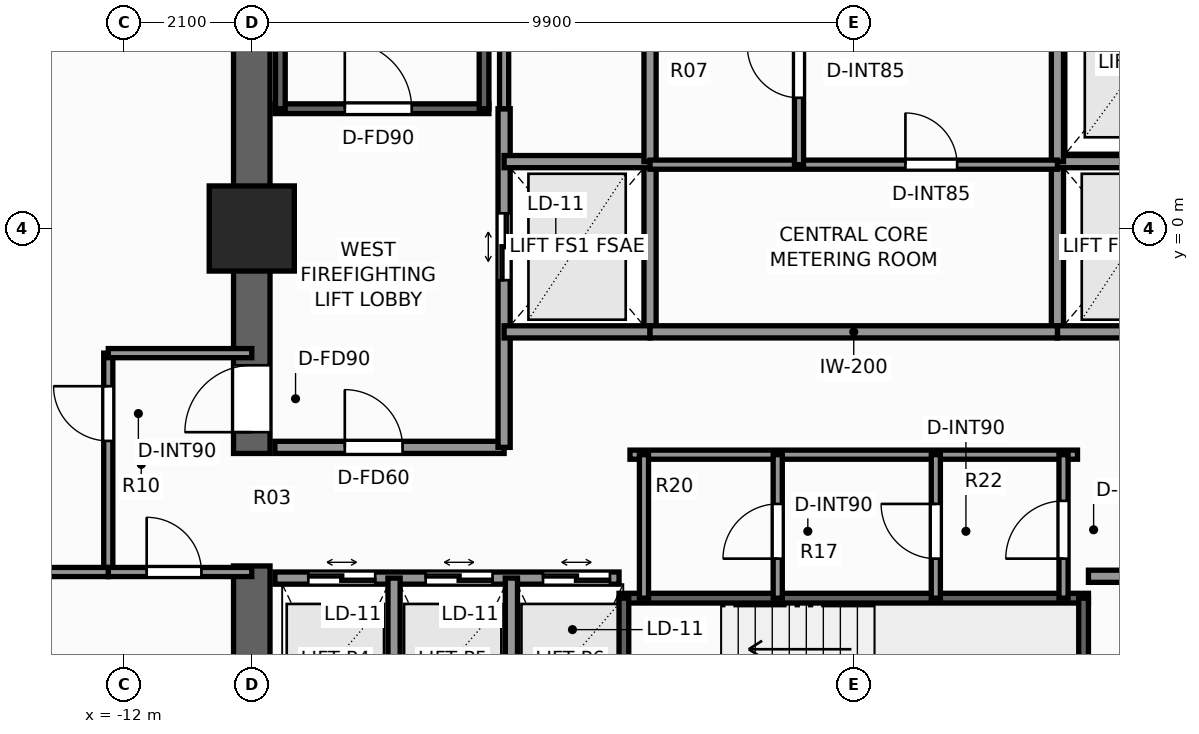
"""IFC4 building model, lengths in metres.
Left out: names, types, materials, properties, quantities, classifications, styles, units other than length and angle.
Written with IfcOpenShell. Run it as: python <this file> out.ifc"""

import sys

from ifc_helpers import new_model, si_unit, direction, frame, frame_2d, origin, origin_2d, place, context, subcontext, project, spatial, rectangle, extrude, element, fill, save


model = new_model("IFC4")
c1 = context("Model", 3, precision=1e-05, world=origin(), true_north=direction((0.0, 1.0)))
c2 = subcontext(c1, "Body", "Model", "MODEL_VIEW")
j1 = project(units=[si_unit("LENGTHUNIT", "METRE"), si_unit("PLANEANGLEUNIT", "RADIAN")], contexts=[c1])
p1 = place(None, origin())
s1 = spatial("IfcSite", under=j1, at=p1, CompositionType="ELEMENT")
p2 = place(p1, origin())
s2 = spatial("IfcBuilding", under=s1, at=p2, CompositionType="ELEMENT")
p3 = place(p2, frame((0.0, 0.0, 98.6)))
s3 = spatial("IfcBuildingStorey", under=s2, at=p3, CompositionType="ELEMENT", Elevation=98.6)
p4 = place(p3, frame((-9.9, -9.6, 0.0), z_axis=(0.0, 0.0, 1.0), x_axis=(0.0, 1.0, 0.0)))
e1 = element("IfcWall", 1, at=p4, inside=s3, PredefinedType="SHEAR", context=c2, shape_type="SweptSolid", body=[
    extrude(rectangle(XDim=4.05, YDim=0.6, at=frame_2d((2.025, 0.0))), origin(), (0.0, 0.0, 1.0), 3.3),
])
p5 = place(p3, frame((-9.9, -3.7, 0.0), z_axis=(0.0, 0.0, 1.0), x_axis=(0.0, 1.0, 0.0)))
e2 = element("IfcWall", 2, at=p5, inside=s3, PredefinedType="SHEAR", context=c2, shape_type="SweptSolid", body=[
    extrude(rectangle(XDim=13.3, YDim=0.6, at=frame_2d((6.65, 0.0))), origin(), (0.0, 0.0, 1.0), 3.3),
])
p6 = place(p5, frame((0.35, 0.0, 0.0)))
e3 = element("IfcOpeningElement", 3, at=p6, cuts=e2, PredefinedType="OPENING", context=c2, shape_type="SweptSolid", body=[
    extrude(rectangle(XDim=1.1, YDim=2.2, at=frame_2d((0.55, 1.1))), frame((0.0, 0.31, 0.0), z_axis=(0.0, -1.0, 0.0), x_axis=(1.0, 0.0, 0.0)), (0.0, 0.0, 1.0), 0.62),
])
p7 = place(p3, frame((-9.9, 0.0, 0.0), z_axis=(0.0, 0.0, 1.0), x_axis=(1.0, 0.0, 0.0)))
e4 = element("IfcColumn", 4, at=p7, inside=s3, PredefinedType="COLUMN", context=c2, shape_type="SweptSolid", body=[
    extrude(rectangle(XDim=1.4, YDim=1.4, at=origin_2d()), origin(), (0.0, 0.0, 1.0), 3.3),
])
p8 = place(p3, frame((-9.52, 1.97, 0.0), z_axis=(0.0, 0.0, 1.0), x_axis=(1.0, 0.0, 0.0)))
e5 = element("IfcWall", 5, at=p8, inside=s3, PredefinedType="SHEAR", context=c2, shape_type="SweptSolid", body=[
    extrude(rectangle(XDim=3.52, YDim=0.16, at=frame_2d((1.76, 0.0))), origin(), (0.0, 0.0, 1.0), 3.3),
])
p9 = place(p8, frame((1.15, 0.0, 0.0)))
e6 = element("IfcOpeningElement", 6, at=p9, cuts=e5, PredefinedType="OPENING", context=c2, shape_type="SweptSolid", body=[
    extrude(rectangle(XDim=1.1, YDim=2.2, at=frame_2d((0.55, 1.1))), frame((0.0, 0.09, 0.0), z_axis=(0.0, -1.0, 0.0), x_axis=(1.0, 0.0, 0.0)), (0.0, 0.0, 1.0), 0.18),
])
for number, where, z_axis, x_axis in (
    (7, (-9.43, 1.97, 0.0), (0.0, 0.0, 1.0), (0.0, 1.0, 0.0)),
    (8, (-6.08, 1.97, 0.0), (0.0, 0.0, 1.0), (0.0, 1.0, 0.0)),
):
    element("IfcWall", number, at=place(p3, frame(where, z_axis=z_axis, x_axis=x_axis)), inside=s3, PredefinedType="SHEAR", context=c2, shape_type="SweptSolid", body=[
        extrude(rectangle(XDim=7.56, YDim=0.16, at=frame_2d((3.78, 0.0))), origin(), (0.0, 0.0, 1.0), 3.3),
    ])
p10 = place(p3, frame((-3.86, -6.08, 0.0), z_axis=(0.0, 0.0, 1.0), x_axis=(1.0, 0.0, 0.0)))
e9 = element("IfcWall", 9, at=p10, inside=s3, PredefinedType="SHEAR", context=c2, shape_type="SweptSolid", body=[
    extrude(rectangle(XDim=7.72, YDim=0.16, at=frame_2d((3.86, 0.0))), origin(), (0.0, 0.0, 1.0), 3.3),
])
for number, where, z_axis, x_axis in (
    (10, (-3.78, -9.43, 0.0), (0.0, 0.0, 1.0), (0.0, 1.0, 0.0)),
    (11, (3.78, -9.43, 0.0), (0.0, 0.0, 1.0), (0.0, 1.0, 0.0)),
):
    element("IfcWall", number, at=place(p3, frame(where, z_axis=z_axis, x_axis=x_axis)), inside=s3, PredefinedType="SHEAR", context=c2, shape_type="SweptSolid", body=[
        extrude(rectangle(XDim=3.35, YDim=0.16, at=frame_2d((1.675, 0.0))), origin(), (0.0, 0.0, 1.0), 3.3),
    ])
p11 = place(p3, frame((-9.52, -3.6, 0.0), z_axis=(0.0, 0.0, 1.0), x_axis=(1.0, 0.0, 0.0)))
e12 = element("IfcWall", 12, at=p11, inside=s3, PredefinedType="SOLIDWALL", context=c2, shape_type="SweptSolid", body=[
    extrude(rectangle(XDim=3.77, YDim=0.2, at=frame_2d((1.885, 0.0))), origin(), (0.0, 0.0, 1.0), 3.08),
])
p12 = place(p11, frame((1.15, 0.0, 0.0)))
e13 = element("IfcOpeningElement", 13, at=p12, cuts=e12, PredefinedType="OPENING", context=c2, shape_type="SweptSolid", body=[
    extrude(rectangle(XDim=0.95, YDim=2.06, at=frame_2d((0.475, 1.03))), frame((0.0, 0.11, 0.0), z_axis=(0.0, -1.0, 0.0), x_axis=(1.0, 0.0, 0.0)), (0.0, 0.0, 1.0), 0.22),
])
p13 = place(p3, frame((-5.75, -3.6, 0.0), z_axis=(0.0, 0.0, 1.0), x_axis=(0.0, 1.0, 0.0)))
e14 = element("IfcWall", 14, at=p13, inside=s3, PredefinedType="SOLIDWALL", context=c2, shape_type="SweptSolid", body=[
    extrude(rectangle(XDim=5.57, YDim=0.2, at=frame_2d((2.785, 0.0))), origin(), (0.0, 0.0, 1.0), 3.08),
])
p14 = place(p13, frame((2.75, 0.0, 0.0)))
e15 = element("IfcOpeningElement", 15, at=p14, cuts=e14, PredefinedType="OPENING", context=c2, shape_type="SweptSolid", body=[
    extrude(rectangle(XDim=1.1, YDim=2.2, at=frame_2d((0.55, 1.1))), frame((0.0, 0.11, 0.0), z_axis=(0.0, -1.0, 0.0), x_axis=(1.0, 0.0, 0.0)), (0.0, 0.0, 1.0), 0.22),
])
p15 = place(p3, frame((-3.35, -1.7, 0.0), z_axis=(0.0, 0.0, 1.0), x_axis=(0.0, 1.0, 0.0)))
e16 = element("IfcWall", 16, at=p15, inside=s3, PredefinedType="SOLIDWALL", context=c2, shape_type="SweptSolid", body=[
    extrude(rectangle(XDim=2.8, YDim=0.2, at=frame_2d((1.4, 0.0))), origin(), (0.0, 0.0, 1.0), 3.08),
])
for number, where, z_axis, x_axis in (
    (17, (-5.75, -1.7, 0.0), (0.0, 0.0, 1.0), (1.0, 0.0, 0.0)),
    (18, (-5.75, 1.1, 0.0), (0.0, 0.0, 1.0), (1.0, 0.0, 0.0)),
):
    element("IfcWall", number, at=place(p3, frame(where, z_axis=z_axis, x_axis=x_axis)), inside=s3, PredefinedType="SOLIDWALL", context=c2, shape_type="SweptSolid", body=[
        extrude(rectangle(XDim=2.4, YDim=0.2, at=frame_2d((1.2, 0.0))), origin(), (0.0, 0.0, 1.0), 3.08),
    ])
p16 = place(p3, frame((3.35, -1.7, 0.0), z_axis=(0.0, 0.0, 1.0), x_axis=(0.0, 1.0, 0.0)))
e19 = element("IfcWall", 19, at=p16, inside=s3, PredefinedType="SOLIDWALL", context=c2, shape_type="SweptSolid", body=[
    extrude(rectangle(XDim=2.8, YDim=0.2, at=frame_2d((1.4, 0.0))), origin(), (0.0, 0.0, 1.0), 3.08),
])
for number, where, z_axis, x_axis in (
    (20, (3.35, -1.7, 0.0), (0.0, 0.0, 1.0), (1.0, 0.0, 0.0)),
    (21, (3.35, 1.1, 0.0), (0.0, 0.0, 1.0), (1.0, 0.0, 0.0)),
):
    element("IfcWall", number, at=place(p3, frame(where, z_axis=z_axis, x_axis=x_axis)), inside=s3, PredefinedType="SOLIDWALL", context=c2, shape_type="SweptSolid", body=[
        extrude(rectangle(XDim=2.4, YDim=0.2, at=frame_2d((1.2, 0.0))), origin(), (0.0, 0.0, 1.0), 3.08),
    ])
p17 = place(p3, frame((-9.52, -5.75, 0.0), z_axis=(0.0, 0.0, 1.0), x_axis=(1.0, 0.0, 0.0)))
e22 = element("IfcWall", 22, at=p17, inside=s3, PredefinedType="SOLIDWALL", context=c2, shape_type="SweptSolid", body=[
    extrude(rectangle(XDim=5.66, YDim=0.2, at=frame_2d((2.83, 0.0))), origin(), (0.0, 0.0, 1.0), 3.08),
])
p18 = place(p17, frame((0.55, 0.0, 0.0)))
e23 = element("IfcOpeningElement", 23, at=p18, cuts=e22, PredefinedType="OPENING", context=c2, shape_type="SweptSolid", body=[
    extrude(rectangle(XDim=1.1, YDim=2.2, at=frame_2d((0.55, 1.1))), frame((0.0, 0.11, 0.0), z_axis=(0.0, -1.0, 0.0), x_axis=(1.0, 0.0, 0.0)), (0.0, 0.0, 1.0), 0.22),
])
p19 = place(p17, frame((2.48, 0.0, 0.0)))
e24 = element("IfcOpeningElement", 24, at=p19, cuts=e22, PredefinedType="OPENING", context=c2, shape_type="SweptSolid", body=[
    extrude(rectangle(XDim=1.1, YDim=2.2, at=frame_2d((0.55, 1.1))), frame((0.0, 0.11, 0.0), z_axis=(0.0, -1.0, 0.0), x_axis=(1.0, 0.0, 0.0)), (0.0, 0.0, 1.0), 0.22),
])
p20 = place(p17, frame((4.41, 0.0, 0.0)))
e25 = element("IfcOpeningElement", 25, at=p20, cuts=e22, PredefinedType="OPENING", context=c2, shape_type="SweptSolid", body=[
    extrude(rectangle(XDim=1.1, YDim=2.2, at=frame_2d((0.55, 1.1))), frame((0.0, 0.11, 0.0), z_axis=(0.0, -1.0, 0.0), x_axis=(1.0, 0.0, 0.0)), (0.0, 0.0, 1.0), 0.22),
])
for number, where, z_axis, x_axis in (
    (26, (-7.56, -9.52, 0.0), (0.0, 0.0, 1.0), (0.0, 1.0, 0.0)),
    (27, (-5.63, -9.52, 0.0), (0.0, 0.0, 1.0), (0.0, 1.0, 0.0)),
):
    element("IfcWall", number, at=place(p3, frame(where, z_axis=z_axis, x_axis=x_axis)), inside=s3, PredefinedType="SOLIDWALL", context=c2, shape_type="SweptSolid", body=[
        extrude(rectangle(XDim=3.77, YDim=0.2, at=frame_2d((1.885, 0.0))), origin(), (0.0, 0.0, 1.0), 3.08),
    ])
p21 = place(p3, frame((3.86, -5.72, 0.0), z_axis=(0.0, 0.0, 1.0), x_axis=(1.0, 0.0, 0.0)))
e28 = element("IfcWall", 28, at=p21, inside=s3, PredefinedType="SOLIDWALL", context=c2, shape_type="SweptSolid", body=[
    extrude(rectangle(XDim=5.66, YDim=0.2, at=frame_2d((2.83, 0.0))), origin(), (0.0, 0.0, 1.0), 3.08),
])
p22 = place(p21, frame((0.85, 0.0, 0.0)))
e29 = element("IfcOpeningElement", 29, at=p22, cuts=e28, PredefinedType="OPENING", context=c2, shape_type="SweptSolid", body=[
    extrude(rectangle(XDim=0.95, YDim=2.06, at=frame_2d((0.475, 1.03))), frame((0.0, 0.11, 0.0), z_axis=(0.0, -1.0, 0.0), x_axis=(1.0, 0.0, 0.0)), (0.0, 0.0, 1.0), 0.22),
])
p23 = place(p21, frame((3.6, 0.0, 0.0)))
e30 = element("IfcOpeningElement", 30, at=p23, cuts=e28, PredefinedType="OPENING", context=c2, shape_type="SweptSolid", body=[
    extrude(rectangle(XDim=0.85, YDim=2.03, at=frame_2d((0.425, 1.015))), frame((0.0, 0.11, 0.0), z_axis=(0.0, -1.0, 0.0), x_axis=(1.0, 0.0, 0.0)), (0.0, 0.0, 1.0), 0.22),
])
p24 = place(p3, frame((-3.35, -1.7, 0.0), z_axis=(0.0, 0.0, 1.0), x_axis=(1.0, 0.0, 0.0)))
e31 = element("IfcWall", 31, at=p24, inside=s3, PredefinedType="SOLIDWALL", context=c2, shape_type="SweptSolid", body=[
    extrude(rectangle(XDim=6.7, YDim=0.2, at=frame_2d((3.35, 0.0))), origin(), (0.0, 0.0, 1.0), 3.08),
])
for number, where, z_axis, x_axis in (
    (32, (-3.35, 1.1, 0.0), (0.0, 0.0, 1.0), (0.0, 1.0, 0.0)),
    (33, (3.35, 1.1, 0.0), (0.0, 0.0, 1.0), (0.0, 1.0, 0.0)),
):
    element("IfcWall", number, at=place(p3, frame(where, z_axis=z_axis, x_axis=x_axis)), inside=s3, PredefinedType="SOLIDWALL", context=c2, shape_type="SweptSolid", body=[
        extrude(rectangle(XDim=3.2, YDim=0.2, at=frame_2d((1.6, 0.0))), origin(), (0.0, 0.0, 1.0), 3.08),
    ])
p25 = place(p3, frame((-3.35, 1.05, 0.0), z_axis=(0.0, 0.0, 1.0), x_axis=(1.0, 0.0, 0.0)))
e34 = element("IfcWall", 34, at=p25, inside=s3, PredefinedType="PARTITIONING", context=c2, shape_type="SweptSolid", body=[
    extrude(rectangle(XDim=6.7, YDim=0.15, at=frame_2d((3.35, 0.0))), origin(), (0.0, 0.0, 1.0), 3.08),
])
p26 = place(p25, frame((4.2, 0.0, 0.0)))
e35 = element("IfcOpeningElement", 35, at=p26, cuts=e34, PredefinedType="OPENING", context=c2, shape_type="SweptSolid", body=[
    extrude(rectangle(XDim=0.85, YDim=2.03, at=frame_2d((0.425, 1.015))), frame((0.0, 0.085, 0.0), z_axis=(0.0, -1.0, 0.0), x_axis=(1.0, 0.0, 0.0)), (0.0, 0.0, 1.0), 0.17),
])
p27 = place(p3, frame((-0.9, 1.05, 0.0), z_axis=(0.0, 0.0, 1.0), x_axis=(0.0, 1.0, 0.0)))
e36 = element("IfcWall", 36, at=p27, inside=s3, PredefinedType="PARTITIONING", context=c2, shape_type="SweptSolid", body=[
    extrude(rectangle(XDim=3.25, YDim=0.15, at=frame_2d((1.625, 0.0))), origin(), (0.0, 0.0, 1.0), 3.08),
])
p28 = place(p27, frame((1.1, 0.0, 0.0)))
e37 = element("IfcOpeningElement", 37, at=p28, cuts=e36, PredefinedType="OPENING", context=c2, shape_type="SweptSolid", body=[
    extrude(rectangle(XDim=0.85, YDim=2.03, at=frame_2d((0.425, 1.015))), frame((0.0, 0.085, 0.0), z_axis=(0.0, -1.0, 0.0), x_axis=(1.0, 0.0, 0.0)), (0.0, 0.0, 1.0), 0.17),
])
p29 = place(p3, frame((-3.68, -3.72, 0.0), z_axis=(0.0, 0.0, 1.0), x_axis=(1.0, 0.0, 0.0)))
e38 = element("IfcWall", 38, at=p29, inside=s3, PredefinedType="PARTITIONING", context=c2, shape_type="SweptSolid", body=[
    extrude(rectangle(XDim=7.36, YDim=0.15, at=frame_2d((3.68, 0.0))), origin(), (0.0, 0.0, 1.0), 3.08),
])
p30 = place(p3, frame((3.45, -6.08, 0.0), z_axis=(0.0, 0.0, 1.0), x_axis=(0.0, 1.0, 0.0)))
e39 = element("IfcWall", 39, at=p30, inside=s3, PredefinedType="PARTITIONING", context=c2, shape_type="SweptSolid", body=[
    extrude(rectangle(XDim=2.36, YDim=0.15, at=frame_2d((1.18, 0.0))), origin(), (0.0, 0.0, 1.0), 3.08),
])
p31 = place(p30, frame((0.65, 0.0, 0.0)))
e40 = element("IfcOpeningElement", 40, at=p31, cuts=e39, PredefinedType="OPENING", context=c2, shape_type="SweptSolid", body=[
    extrude(rectangle(XDim=0.95, YDim=2.06, at=frame_2d((0.475, 1.03))), frame((0.0, 0.085, 0.0), z_axis=(0.0, -1.0, 0.0), x_axis=(1.0, 0.0, 0.0)), (0.0, 0.0, 1.0), 0.17),
])
p32 = place(p3, frame((-3.45, -6.08, 0.0), z_axis=(0.0, 0.0, 1.0), x_axis=(0.0, 1.0, 0.0)))
e41 = element("IfcWall", 41, at=p32, inside=s3, PredefinedType="PARTITIONING", context=c2, shape_type="SweptSolid", body=[
    extrude(rectangle(XDim=2.36, YDim=0.15, at=frame_2d((1.18, 0.0))), origin(), (0.0, 0.0, 1.0), 3.08),
])
p33 = place(p3, frame((1.35, -6.08, 0.0), z_axis=(0.0, 0.0, 1.0), x_axis=(0.0, 1.0, 0.0)))
e42 = element("IfcWall", 42, at=p33, inside=s3, PredefinedType="PARTITIONING", context=c2, shape_type="SweptSolid", body=[
    extrude(rectangle(XDim=2.36, YDim=0.15, at=frame_2d((1.18, 0.0))), origin(), (0.0, 0.0, 1.0), 3.08),
])
p34 = place(p33, frame((0.65, 0.0, 0.0)))
e43 = element("IfcOpeningElement", 43, at=p34, cuts=e42, PredefinedType="OPENING", context=c2, shape_type="SweptSolid", body=[
    extrude(rectangle(XDim=0.9, YDim=2.06, at=frame_2d((0.45, 1.03))), frame((0.0, 0.085, 0.0), z_axis=(0.0, -1.0, 0.0), x_axis=(1.0, 0.0, 0.0)), (0.0, 0.0, 1.0), 0.17),
])
p35 = place(p3, frame((-1.25, -6.08, 0.0), z_axis=(0.0, 0.0, 1.0), x_axis=(0.0, 1.0, 0.0)))
e44 = element("IfcWall", 44, at=p35, inside=s3, PredefinedType="PARTITIONING", context=c2, shape_type="SweptSolid", body=[
    extrude(rectangle(XDim=2.36, YDim=0.15, at=frame_2d((1.18, 0.0))), origin(), (0.0, 0.0, 1.0), 3.08),
])
p36 = place(p35, frame((0.65, 0.0, 0.0)))
e45 = element("IfcOpeningElement", 45, at=p36, cuts=e44, PredefinedType="OPENING", context=c2, shape_type="SweptSolid", body=[
    extrude(rectangle(XDim=0.9, YDim=2.06, at=frame_2d((0.45, 1.03))), frame((0.0, 0.085, 0.0), z_axis=(0.0, -1.0, 0.0), x_axis=(1.0, 0.0, 0.0)), (0.0, 0.0, 1.0), 0.17),
])
p37 = place(p3, frame((-5.75, 1.97, 0.0), z_axis=(0.0, 0.0, 1.0), x_axis=(0.0, 1.0, 0.0)))
e46 = element("IfcWall", 46, at=p37, inside=s3, PredefinedType="PARTITIONING", context=c2, shape_type="SweptSolid", body=[
    extrude(rectangle(XDim=2.33, YDim=0.15, at=frame_2d((1.165, 0.0))), origin(), (0.0, 0.0, 1.0), 3.08),
])
p38 = place(p3, frame((-12.26, -5.65, 0.0), z_axis=(0.0, 0.0, 1.0), x_axis=(0.0, 1.0, 0.0)))
e47 = element("IfcWall", 47, at=p38, inside=s3, PredefinedType="PARTITIONING", context=c2, shape_type="SweptSolid", body=[
    extrude(rectangle(XDim=3.6, YDim=0.15, at=frame_2d((1.8, 0.0))), origin(), (0.0, 0.0, 1.0), 2.292),
])
p39 = place(p38, frame((2.156, 0.0, 0.0)))
e48 = element("IfcOpeningElement", 48, at=p39, cuts=e47, PredefinedType="OPENING", context=c2, shape_type="SweptSolid", body=[
    extrude(rectangle(XDim=0.9, YDim=2.06, at=frame_2d((0.45, 1.03))), frame((0.0, 0.085, 0.0), z_axis=(0.0, -1.0, 0.0), x_axis=(1.0, 0.0, 0.0)), (0.0, 0.0, 1.0), 0.17),
])
p40 = place(p3, frame((-12.26, -2.05, 0.0), z_axis=(0.0, 0.0, 1.0), x_axis=(1.0, 0.0, 0.0)))
e49 = element("IfcWall", 49, at=p40, inside=s3, PredefinedType="PARTITIONING", context=c2, shape_type="SweptSolid", body=[
    extrude(rectangle(XDim=2.36, YDim=0.15, at=frame_2d((1.18, 0.0))), origin(), (0.0, 0.0, 1.0), 3.08),
])
p41 = place(p3, frame((-12.26, -5.65, 0.0), z_axis=(0.0, 0.0, 1.0), x_axis=(1.0, 0.0, 0.0)))
e50 = element("IfcWall", 50, at=p41, inside=s3, PredefinedType="PARTITIONING", context=c2, shape_type="SweptSolid", body=[
    extrude(rectangle(XDim=2.36, YDim=0.15, at=frame_2d((1.18, 0.0))), origin(), (0.0, 0.0, 1.0), 3.08),
])
p42 = place(p41, frame((0.632, 0.0, 0.0)))
e51 = element("IfcOpeningElement", 51, at=p42, cuts=e50, PredefinedType="OPENING", context=c2, shape_type="SweptSolid", body=[
    extrude(rectangle(XDim=0.9, YDim=2.06, at=frame_2d((0.45, 1.03))), frame((0.0, 0.085, 0.0), z_axis=(0.0, -1.0, 0.0), x_axis=(1.0, 0.0, 0.0)), (0.0, 0.0, 1.0), 0.17),
])
p43 = place(p3, frame((-20.38, -5.65, 0.0), z_axis=(0.0, 0.0, 1.0), x_axis=(1.0, 0.0, 0.0)))
e52 = element("IfcWall", 52, at=p43, inside=s3, PredefinedType="PARTITIONING", context=c2, shape_type="SweptSolid", body=[
    extrude(rectangle(XDim=8.12, YDim=0.15, at=frame_2d((4.06, 0.0))), origin(), (0.0, 0.0, 1.0), 2.449),
])
p44 = place(p9, origin())
e53 = element("IfcDoor", 53, at=p44, inside=s3, OperationType="SINGLE_SWING_LEFT", PredefinedType="DOOR", context=c2, shape_type="SweptSolid", body=[
    extrude(rectangle(XDim=1.1, YDim=2.2, at=frame_2d((0.55, 1.1))), frame((0.0, 0.025, 0.0), z_axis=(0.0, -1.0, 0.0), x_axis=(1.0, 0.0, 0.0)), (0.0, 0.0, 1.0), 0.05),
])
fill(e6, e53)
p45 = place(p6, origin())
e54 = element("IfcDoor", 54, at=p45, inside=s3, OperationType="SINGLE_SWING_LEFT", PredefinedType="DOOR", context=c2, shape_type="SweptSolid", body=[
    extrude(rectangle(XDim=1.1, YDim=2.2, at=frame_2d((0.55, 1.1))), frame((0.0, 0.025, 0.0), z_axis=(0.0, -1.0, 0.0), x_axis=(1.0, 0.0, 0.0)), (0.0, 0.0, 1.0), 0.05),
])
fill(e3, e54)
p46 = place(p14, origin())
e55 = element("IfcDoor", 55, at=p46, inside=s3, OperationType="DOUBLE_DOOR_SLIDING", PredefinedType="DOOR", context=c2, shape_type="SweptSolid", body=[
    extrude(rectangle(XDim=1.1, YDim=2.2, at=frame_2d((0.55, 1.1))), frame((0.0, 0.025, 0.0), z_axis=(0.0, -1.0, 0.0), x_axis=(1.0, 0.0, 0.0)), (0.0, 0.0, 1.0), 0.05),
])
fill(e15, e55)
p47 = place(p18, origin())
e56 = element("IfcDoor", 56, at=p47, inside=s3, OperationType="DOUBLE_DOOR_SLIDING", PredefinedType="DOOR", context=c2, shape_type="SweptSolid", body=[
    extrude(rectangle(XDim=1.1, YDim=2.2, at=frame_2d((0.55, 1.1))), frame((0.0, 0.025, 0.0), z_axis=(0.0, -1.0, 0.0), x_axis=(1.0, 0.0, 0.0)), (0.0, 0.0, 1.0), 0.05),
])
fill(e23, e56)
p48 = place(p19, origin())
e57 = element("IfcDoor", 57, at=p48, inside=s3, OperationType="DOUBLE_DOOR_SLIDING", PredefinedType="DOOR", context=c2, shape_type="SweptSolid", body=[
    extrude(rectangle(XDim=1.1, YDim=2.2, at=frame_2d((0.55, 1.1))), frame((0.0, 0.025, 0.0), z_axis=(0.0, -1.0, 0.0), x_axis=(1.0, 0.0, 0.0)), (0.0, 0.0, 1.0), 0.05),
])
fill(e24, e57)
p49 = place(p20, origin())
e58 = element("IfcDoor", 58, at=p49, inside=s3, OperationType="DOUBLE_DOOR_SLIDING", PredefinedType="DOOR", context=c2, shape_type="SweptSolid", body=[
    extrude(rectangle(XDim=1.1, YDim=2.2, at=frame_2d((0.55, 1.1))), frame((0.0, 0.025, 0.0), z_axis=(0.0, -1.0, 0.0), x_axis=(1.0, 0.0, 0.0)), (0.0, 0.0, 1.0), 0.05),
])
fill(e25, e58)
p50 = place(p12, origin())
e59 = element("IfcDoor", 59, at=p50, inside=s3, OperationType="SINGLE_SWING_LEFT", PredefinedType="DOOR", context=c2, shape_type="SweptSolid", body=[
    extrude(rectangle(XDim=0.95, YDim=2.06, at=frame_2d((0.475, 1.03))), frame((0.0, 0.025, 0.0), z_axis=(0.0, -1.0, 0.0), x_axis=(1.0, 0.0, 0.0)), (0.0, 0.0, 1.0), 0.05),
])
fill(e13, e59)
p51 = place(p26, origin())
e60 = element("IfcDoor", 60, at=p51, inside=s3, OperationType="SINGLE_SWING_LEFT", PredefinedType="DOOR", context=c2, shape_type="SweptSolid", body=[
    extrude(rectangle(XDim=0.85, YDim=2.03, at=frame_2d((0.425, 1.015))), frame((0.0, 0.025, 0.0), z_axis=(0.0, -1.0, 0.0), x_axis=(1.0, 0.0, 0.0)), (0.0, 0.0, 1.0), 0.05),
])
fill(e35, e60)
p52 = place(p28, origin())
e61 = element("IfcDoor", 61, at=p52, inside=s3, OperationType="SINGLE_SWING_RIGHT", PredefinedType="DOOR", context=c2, shape_type="SweptSolid", body=[
    extrude(rectangle(XDim=0.85, YDim=2.03, at=frame_2d((0.425, 1.015))), frame((0.0, 0.025, 0.0), z_axis=(0.0, -1.0, 0.0), x_axis=(1.0, 0.0, 0.0)), (0.0, 0.0, 1.0), 0.05),
])
fill(e37, e61)
p53 = place(p31, origin())
e62 = element("IfcDoor", 62, at=p53, inside=s3, OperationType="SINGLE_SWING_LEFT", PredefinedType="DOOR", context=c2, shape_type="SweptSolid", body=[
    extrude(rectangle(XDim=0.95, YDim=2.06, at=frame_2d((0.475, 1.03))), frame((0.0, 0.025, 0.0), z_axis=(0.0, -1.0, 0.0), x_axis=(1.0, 0.0, 0.0)), (0.0, 0.0, 1.0), 0.05),
])
fill(e40, e62)
p54 = place(p34, origin())
e63 = element("IfcDoor", 63, at=p54, inside=s3, OperationType="SINGLE_SWING_RIGHT", PredefinedType="DOOR", context=c2, shape_type="SweptSolid", body=[
    extrude(rectangle(XDim=0.9, YDim=2.06, at=frame_2d((0.45, 1.03))), frame((0.0, 0.025, 0.0), z_axis=(0.0, -1.0, 0.0), x_axis=(1.0, 0.0, 0.0)), (0.0, 0.0, 1.0), 0.05),
])
fill(e43, e63)
p55 = place(p36, origin())
e64 = element("IfcDoor", 64, at=p55, inside=s3, OperationType="SINGLE_SWING_LEFT", PredefinedType="DOOR", context=c2, shape_type="SweptSolid", body=[
    extrude(rectangle(XDim=0.9, YDim=2.06, at=frame_2d((0.45, 1.03))), frame((0.0, 0.025, 0.0), z_axis=(0.0, -1.0, 0.0), x_axis=(1.0, 0.0, 0.0)), (0.0, 0.0, 1.0), 0.05),
])
fill(e45, e64)
p56 = place(p39, origin())
e65 = element("IfcDoor", 65, at=p56, inside=s3, OperationType="SINGLE_SWING_RIGHT", PredefinedType="DOOR", context=c2, shape_type="SweptSolid", body=[
    extrude(rectangle(XDim=0.9, YDim=2.06, at=frame_2d((0.45, 1.03))), frame((0.0, 0.025, 0.0), z_axis=(0.0, -1.0, 0.0), x_axis=(1.0, 0.0, 0.0)), (0.0, 0.0, 1.0), 0.05),
])
fill(e48, e65)
p57 = place(p42, origin())
e66 = element("IfcDoor", 66, at=p57, inside=s3, OperationType="SINGLE_SWING_LEFT", PredefinedType="DOOR", context=c2, shape_type="SweptSolid", body=[
    extrude(rectangle(XDim=0.9, YDim=2.06, at=frame_2d((0.45, 1.03))), frame((0.0, 0.025, 0.0), z_axis=(0.0, -1.0, 0.0), x_axis=(1.0, 0.0, 0.0)), (0.0, 0.0, 1.0), 0.05),
])
fill(e51, e66)
save(model, sys.argv[1])
